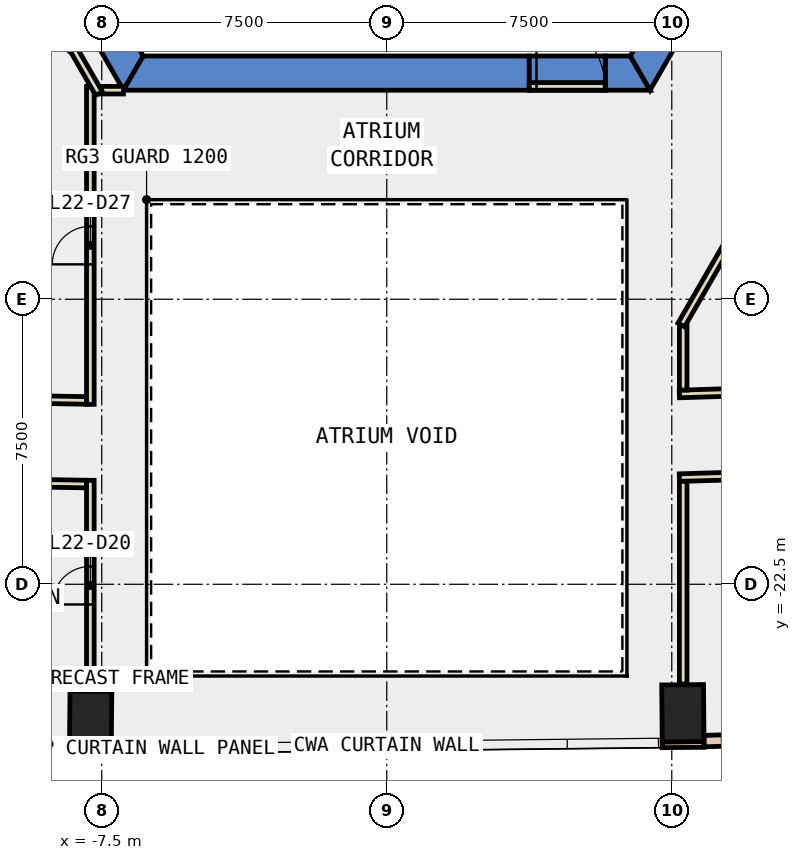
"""IFC4 building model, lengths in metres.
Left out: names, types, materials, properties, quantities, classifications, styles, units other than length and angle.
Written with IfcOpenShell. Run it as: python <this file> out.ifc"""

import sys

from ifc_helpers import new_model, si_unit, direction, frame, frame_2d, origin, origin_2d, place, context, subcontext, project, spatial, polyline, rectangle, outline, extrude, element, fill, save


model = new_model("IFC4")
c1 = context("Model", 3, precision=1e-05, world=origin(), true_north=direction((0.0, 1.0)))
c2 = subcontext(c1, "Body", "Model", "MODEL_VIEW")
j1 = project(units=[si_unit("LENGTHUNIT", "METRE"), si_unit("PLANEANGLEUNIT", "RADIAN")], contexts=[c1])
p1 = place(None, origin())
s1 = spatial("IfcSite", under=j1, at=p1, CompositionType="ELEMENT")
p2 = place(p1, origin())
s2 = spatial("IfcBuilding", under=s1, at=p2, CompositionType="ELEMENT")
p3 = place(p2, frame((0.0, 0.0, 103.4)))
s3 = spatial("IfcBuildingStorey", under=s2, at=p3, CompositionType="ELEMENT", Elevation=103.4)
for number, where, z_axis, x_axis in (
    (1, (-7.792, -26.066, -0.4), (0.0, 0.0, 1.0), (-1.0, 0.009, 0.0)),
    (2, (7.792, -25.894, -0.4), (0.0, 0.0, 1.0), (1.0, 0.009, 0.0)),
):
    element("IfcColumn", number, at=place(p3, frame(where, z_axis=z_axis, x_axis=x_axis)), inside=s3, PredefinedType="COLUMN", context=c2, shape_type="SweptSolid", body=[
        extrude(rectangle(XDim=1.1, YDim=1.5, at=origin_2d()), origin(), (0.0, 0.0, 1.0), 4.2),
    ])
p4 = place(p3, frame((0.0, 0.0, -0.4)))
e3 = element("IfcWall", 3, at=p4, inside=s3, PredefinedType="SHEAR", context=c2, shape_type="SweptSolid", body=[
    extrude(outline(polyline([(-13.856, 2.5), (-6.928, -9.5), (-6.409, -8.6), (-12.817, 2.5), (-13.856, 2.5)])), origin(), (0.0, 0.0, 1.0), 4.2),
])
p5 = place(p3, frame((0.0, 0.0, -0.4)))
e4 = element("IfcWall", 4, at=p5, inside=s3, PredefinedType="SHEAR", context=c2, shape_type="SweptSolid", body=[
    extrude(outline(polyline([(3.75, -9.5), (3.75, -8.6), (-6.409, -8.6), (-6.928, -9.5), (3.75, -9.5)])), origin(), (0.0, 0.0, 1.0), 4.2),
])
p6 = place(p3, frame((0.0, 0.0, -0.4)))
e5 = element("IfcWall", 5, at=p6, inside=s3, PredefinedType="SHEAR", context=c2, shape_type="SweptSolid", body=[
    extrude(outline(polyline([(5.75, -8.6), (5.75, -9.5), (6.928, -9.5), (6.409, -8.6), (5.75, -8.6)])), origin(), (0.0, 0.0, 1.0), 4.2),
])
p7 = place(p3, frame((0.0, 0.0, 3.6)))
e6 = element("IfcWall", 6, at=p7, inside=s3, PredefinedType="SHEAR", context=c2, shape_type="SweptSolid", body=[
    extrude(outline(polyline([(5.75, -9.5), (5.75, -8.6), (3.75, -8.6), (3.75, -9.5), (5.75, -9.5)])), origin(), (0.0, 0.0, 1.0), 0.2),
])
p8 = place(p3, frame((0.0, 0.0, -0.4)))
e7 = element("IfcWall", 7, at=p8, inside=s3, PredefinedType="SHEAR", context=c2, shape_type="SweptSolid", body=[
    extrude(outline(polyline([(8.117, -7.44), (7.338, -6.99), (6.409, -8.6), (6.928, -9.5), (8.117, -7.44)])), origin(), (0.0, 0.0, 1.0), 4.2),
])
for number, where, z_axis, x_axis in (
    (8, (-8.349, -26.886, 0.0), (0.0, 0.0, 1.0), (1.0, -0.009, 0.0)),
    (9, (7.249, -26.724, 0.0), (0.0, 0.0, 1.0), (1.0, 0.009, 0.0)),
):
    element("IfcWall", number, at=place(p3, frame(where, z_axis=z_axis, x_axis=x_axis)), inside=s3, PredefinedType="STANDARD", context=c2, shape_type="SweptSolid", body=[
        extrude(rectangle(XDim=1.1, YDim=0.15, at=frame_2d((0.55, 0.0))), origin(), (0.0, 0.0, 1.0), 3.8),
    ])
p9 = place(p3, frame((-14.242, -26.703, 0.0), z_axis=(0.0, 0.0, 1.0), x_axis=(0.999847261365, -0.017477240672, 0.0)))
e10 = element("IfcWall", 10, at=p9, inside=s3, PredefinedType="STANDARD", context=c2, shape_type="SweptSolid", body=[
    extrude(rectangle(XDim=5.895, YDim=0.3, at=frame_2d((2.948, 0.0))), origin(), (0.0, 0.0, 1.0), 3.8),
])
p10 = place(p9, frame((0.474, 0.0, 0.9)))
e11 = element("IfcOpeningElement", 11, at=p10, cuts=e10, PredefinedType="OPENING", context=c2, shape_type="SweptSolid", body=[
    extrude(rectangle(XDim=2.0, YDim=2.6, at=frame_2d((1.0, 1.3))), frame((0.0, 0.16, 0.0), z_axis=(0.0, -1.0, 0.0), x_axis=(1.0, 0.0, 0.0)), (0.0, 0.0, 1.0), 0.32),
])
p11 = place(p9, frame((3.421, 0.0, 0.9)))
e12 = element("IfcOpeningElement", 12, at=p11, cuts=e10, PredefinedType="OPENING", context=c2, shape_type="SweptSolid", body=[
    extrude(rectangle(XDim=2.0, YDim=2.6, at=frame_2d((1.0, 1.3))), frame((0.0, 0.16, 0.0), z_axis=(0.0, -1.0, 0.0), x_axis=(1.0, 0.0, 0.0)), (0.0, 0.0, 1.0), 0.32),
])
p12 = place(p3, frame((8.347, -26.627, 0.0), z_axis=(0.0, 0.0, 1.0), x_axis=(0.999529601824, 0.030668796478, 0.0)))
e13 = element("IfcWall", 13, at=p12, inside=s3, PredefinedType="STANDARD", context=c2, shape_type="SweptSolid", body=[
    extrude(rectangle(XDim=5.899, YDim=0.3, at=frame_2d((2.949, 0.0))), origin(), (0.0, 0.0, 1.0), 3.8),
])
p13 = place(p12, frame((0.475, 0.0, 0.9)))
e14 = element("IfcOpeningElement", 14, at=p13, cuts=e13, PredefinedType="OPENING", context=c2, shape_type="SweptSolid", body=[
    extrude(rectangle(XDim=2.0, YDim=2.6, at=frame_2d((1.0, 1.3))), frame((0.0, 0.16, 0.0), z_axis=(0.0, -1.0, 0.0), x_axis=(1.0, 0.0, 0.0)), (0.0, 0.0, 1.0), 0.32),
])
p14 = place(p12, frame((3.424, 0.0, 0.9)))
e15 = element("IfcOpeningElement", 15, at=p14, cuts=e13, PredefinedType="OPENING", context=c2, shape_type="SweptSolid", body=[
    extrude(rectangle(XDim=2.0, YDim=2.6, at=frame_2d((1.0, 1.3))), frame((0.0, 0.16, 0.0), z_axis=(0.0, -1.0, 0.0), x_axis=(1.0, 0.0, 0.0)), (0.0, 0.0, 1.0), 0.32),
])
p15 = place(p3, frame((7.7, -17.493, 0.0), z_axis=(0.0, 0.0, 1.0), x_axis=(0.999526319751, 0.030775576778, 0.0)))
e16 = element("IfcWall", 16, at=p15, inside=s3, PredefinedType="PARTITIONING", context=c2, shape_type="SweptSolid", body=[
    extrude(rectangle(XDim=6.822, YDim=0.2, at=frame_2d((3.411, 0.0))), origin(), (0.0, 0.0, 1.0), 3.8),
])
p16 = place(p15, frame((2.911, 0.0, 0.0)))
e17 = element("IfcOpeningElement", 17, at=p16, cuts=e16, PredefinedType="OPENING", context=c2, shape_type="SweptSolid", body=[
    extrude(rectangle(XDim=1.0, YDim=2.1, at=frame_2d((0.5, 1.05))), frame((0.0, 0.11, 0.0), z_axis=(0.0, -1.0, 0.0), x_axis=(1.0, 0.0, 0.0)), (0.0, 0.0, 1.0), 0.22),
])
p17 = place(p3, frame((-10.923, -17.61, 0.0), z_axis=(0.0, 0.0, 1.0), x_axis=(0.999846489632, -0.017521334753, 0.0)))
e18 = element("IfcWall", 18, at=p17, inside=s3, PredefinedType="PARTITIONING", context=c2, shape_type="SweptSolid", body=[
    extrude(rectangle(XDim=3.024, YDim=0.2, at=frame_2d((1.512, 0.0))), origin(), (0.0, 0.0, 1.0), 3.8),
])
p18 = place(p3, frame((21.621, -19.28, 0.0), z_axis=(0.0, 0.0, 1.0), x_axis=(-0.999557957525, -0.029730280001, 0.0)))
e19 = element("IfcWall", 19, at=p18, inside=s3, PredefinedType="PARTITIONING", context=c2, shape_type="SweptSolid", body=[
    extrude(rectangle(XDim=13.927, YDim=0.2, at=frame_2d((6.964, 0.0))), origin(), (0.0, 0.0, 1.0), 3.8),
])
p19 = place(p18, frame((6.464, 0.0, 0.0)))
e20 = element("IfcOpeningElement", 20, at=p19, cuts=e19, PredefinedType="OPENING", context=c2, shape_type="SweptSolid", body=[
    extrude(rectangle(XDim=1.0, YDim=2.1, at=frame_2d((0.5, 1.05))), frame((0.0, 0.11, 0.0), z_axis=(0.0, -1.0, 0.0), x_axis=(1.0, 0.0, 0.0)), (0.0, 0.0, 1.0), 0.22),
])
p20 = place(p3, frame((-7.9, -19.863, 0.0), z_axis=(0.0, 0.0, 1.0), x_axis=(-0.999845883554, 0.017555886191, 0.0)))
e21 = element("IfcWall", 21, at=p20, inside=s3, PredefinedType="PARTITIONING", context=c2, shape_type="SweptSolid", body=[
    extrude(rectangle(XDim=3.198, YDim=0.2, at=frame_2d((1.599, 0.0))), origin(), (0.0, 0.0, 1.0), 3.8),
])
p21 = place(p3, frame((7.8, -15.69, 0.0), z_axis=(0.0, 0.0, 1.0), x_axis=(0.0, -1.0, 0.0)))
e22 = element("IfcWall", 22, at=p21, inside=s3, PredefinedType="PARTITIONING", context=c2, shape_type="SweptSolid", body=[
    extrude(rectangle(XDim=1.7, YDim=0.2, at=frame_2d((0.85, 0.0))), origin(), (0.0, 0.0, 1.0), 3.8),
])
p22 = place(p3, frame((-7.522, -9.499, 0.0), z_axis=(0.0, 0.0, 1.0), x_axis=(1.0, 0.0, 0.0)))
e23 = element("IfcWall", 23, at=p22, inside=s3, PredefinedType="PARTITIONING", context=c2, shape_type="SweptSolid", body=[
    extrude(rectangle(XDim=0.593, YDim=0.2, at=frame_2d((0.296, 0.0))), origin(), (0.0, 0.0, 1.0), 3.8),
])
p23 = place(p3, frame((-7.8, -17.765, 0.0), z_axis=(0.0, 0.0, 1.0), x_axis=(0.0, 1.0, 0.0)))
e24 = element("IfcWall", 24, at=p23, inside=s3, PredefinedType="PARTITIONING", context=c2, shape_type="SweptSolid", body=[
    extrude(rectangle(XDim=8.366, YDim=0.2, at=frame_2d((4.183, 0.0))), origin(), (0.0, 0.0, 1.0), 3.8),
])
p24 = place(p23, frame((3.683, 0.0, 0.0)))
e25 = element("IfcOpeningElement", 25, at=p24, cuts=e24, PredefinedType="OPENING", context=c2, shape_type="SweptSolid", body=[
    extrude(rectangle(XDim=1.0, YDim=2.1, at=frame_2d((0.5, 1.05))), frame((0.0, 0.11, 0.0), z_axis=(0.0, -1.0, 0.0), x_axis=(1.0, 0.0, 0.0)), (0.0, 0.0, 1.0), 0.22),
])
p25 = place(p3, frame((7.8, -19.791, 0.0), z_axis=(0.0, 0.0, 1.0), x_axis=(0.0, -1.0, 0.0)))
e26 = element("IfcWall", 26, at=p25, inside=s3, PredefinedType="PARTITIONING", context=c2, shape_type="SweptSolid", body=[
    extrude(rectangle(XDim=5.333, YDim=0.2, at=frame_2d((2.667, 0.0))), origin(), (0.0, 0.0, 1.0), 3.8),
])
p26 = place(p3, frame((-7.8, -25.296, 0.0), z_axis=(0.0, 0.0, 1.0), x_axis=(0.0, 1.0, 0.0)))
e27 = element("IfcWall", 27, at=p26, inside=s3, PredefinedType="PARTITIONING", context=c2, shape_type="SweptSolid", body=[
    extrude(rectangle(XDim=5.531, YDim=0.2, at=frame_2d((2.766, 0.0))), origin(), (0.0, 0.0, 1.0), 3.8),
])
p27 = place(p26, frame((2.265, 0.0, 0.0)))
e28 = element("IfcOpeningElement", 28, at=p27, cuts=e27, PredefinedType="OPENING", context=c2, shape_type="SweptSolid", body=[
    extrude(rectangle(XDim=1.0, YDim=2.1, at=frame_2d((0.5, 1.05))), frame((0.0, 0.11, 0.0), z_axis=(0.0, -1.0, 0.0), x_axis=(1.0, 0.0, 0.0)), (0.0, 0.0, 1.0), 0.22),
])
p28 = place(p3, frame((12.401, -7.621, 0.0), z_axis=(0.0, 0.0, 1.0), x_axis=(-0.499983724212, -0.866034800411, 0.0)))
e29 = element("IfcWall", 29, at=p28, inside=s3, PredefinedType="PARTITIONING", context=c2, shape_type="SweptSolid", body=[
    extrude(rectangle(XDim=9.302, YDim=0.2, at=frame_2d((4.651, 0.0))), origin(), (0.0, 0.0, 1.0), 3.8),
])
p29 = place(p3, frame((-7.572, -9.586, 0.0), z_axis=(0.0, 0.0, 1.0), x_axis=(-0.499484152563, 0.866323023669, 0.0)))
e30 = element("IfcWall", 30, at=p29, inside=s3, PredefinedType="PARTITIONING", context=c2, shape_type="SweptSolid", body=[
    extrude(rectangle(XDim=1.39, YDim=0.2, at=frame_2d((0.695, 0.0))), origin(), (0.0, 0.0, 1.0), 3.8),
])
p30 = place(p3, frame((3.75, -9.4, 0.0), z_axis=(0.0, 0.0, 1.0), x_axis=(1.0, 0.0, 0.0)))
e31 = element("IfcWall", 31, at=p30, inside=s3, PredefinedType="PARTITIONING", context=c2, shape_type="SweptSolid", body=[
    extrude(rectangle(XDim=2.0, YDim=0.2, at=frame_2d((1.0, 0.0))), origin(), (0.0, 0.0, 1.0), 2.4),
])
p31 = place(p30, frame((0.19, 0.0, 0.0)))
e32 = element("IfcOpeningElement", 32, at=p31, cuts=e31, PredefinedType="OPENING", context=c2, shape_type="SweptSolid", body=[
    extrude(rectangle(XDim=1.8, YDim=2.1, at=frame_2d((0.9, 1.05))), frame((0.0, 0.11, 0.0), z_axis=(0.0, -1.0, 0.0), x_axis=(1.0, 0.0, 0.0)), (0.0, 0.0, 1.0), 0.22),
])
p32 = place(p27, origin())
e33 = element("IfcDoor", 33, at=p32, inside=s3, OperationType="SINGLE_SWING_LEFT", PredefinedType="DOOR", context=c2, shape_type="SweptSolid", body=[
    extrude(rectangle(XDim=1.0, YDim=2.1, at=frame_2d((0.5, 1.05))), frame((0.0, 0.025, 0.0), z_axis=(0.0, -1.0, 0.0), x_axis=(1.0, 0.0, 0.0)), (0.0, 0.0, 1.0), 0.05),
])
fill(e28, e33)
p33 = place(p24, origin())
e34 = element("IfcDoor", 34, at=p33, inside=s3, OperationType="SINGLE_SWING_RIGHT", PredefinedType="DOOR", context=c2, shape_type="SweptSolid", body=[
    extrude(rectangle(XDim=1.0, YDim=2.1, at=frame_2d((0.5, 1.05))), frame((0.0, 0.025, 0.0), z_axis=(0.0, -1.0, 0.0), x_axis=(1.0, 0.0, 0.0)), (0.0, 0.0, 1.0), 0.05),
])
fill(e25, e34)
p34 = place(p31, origin())
e35 = element("IfcDoor", 35, at=p34, inside=s3, OperationType="DOUBLE_DOOR_SINGLE_SWING", PredefinedType="DOOR", context=c2, shape_type="SweptSolid", body=[
    extrude(rectangle(XDim=1.8, YDim=2.1, at=frame_2d((0.9, 1.05))), frame((0.0, 0.025, 0.0), z_axis=(0.0, -1.0, 0.0), x_axis=(1.0, 0.0, 0.0)), (0.0, 0.0, 1.0), 0.05),
])
fill(e32, e35)
save(model, sys.argv[1])
